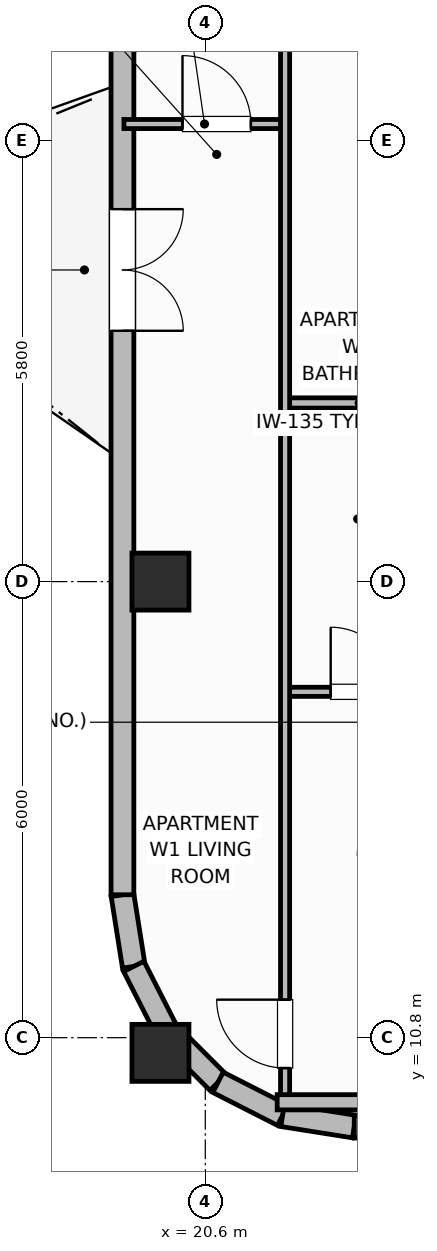
"""IFC4 building model, lengths in metres.
Left out: names, types, materials, properties, quantities, classifications, styles, units other than length and angle.
Written with IfcOpenShell. Run it as: python <this file> out.ifc"""

import sys

from ifc_helpers import new_model, si_unit, direction, frame, frame_2d, origin, origin_2d, place, context, subcontext, project, spatial, rectangle, extrude, element, fill, save


model = new_model("IFC4")
c1 = context("Model", 3, precision=1e-05, world=origin(), true_north=direction((0.0, 1.0)))
c2 = subcontext(c1, "Body", "Model", "MODEL_VIEW")
j1 = project(units=[si_unit("LENGTHUNIT", "METRE"), si_unit("PLANEANGLEUNIT", "RADIAN")], contexts=[c1])
p1 = place(None, origin())
s1 = spatial("IfcSite", under=j1, at=p1, CompositionType="ELEMENT")
p2 = place(p1, origin())
s2 = spatial("IfcBuilding", under=s1, at=p2, CompositionType="ELEMENT")
p3 = place(p2, frame((0.0, 0.0, 275.0)))
s3 = spatial("IfcBuildingStorey", under=s2, at=p3, CompositionType="ELEMENT", Elevation=275.0)
for number, where, z_axis, x_axis in (
    (1, (20.01, 10.6, 0.0), (0.0, 0.0, 1.0), (1.0, 0.0, 0.0)),
    (2, (20.01, 16.8, 0.0), (0.0, 0.0, 1.0), (1.0, 0.0, 0.0)),
):
    element("IfcColumn", number, at=place(p3, frame(where, z_axis=z_axis, x_axis=x_axis)), inside=s3, PredefinedType="COLUMN", context=c2, shape_type="SweptSolid", body=[
        extrude(rectangle(XDim=0.75, YDim=0.75, at=origin_2d()), origin(), (0.0, 0.0, 1.0), 3.7),
    ])
p4 = place(p3, frame((19.51, 12.68, 0.0), z_axis=(0.0, 0.0, 1.0), x_axis=(0.156343617883, -0.987702725088, 0.0)))
e3 = element("IfcWall", 3, at=p4, inside=s3, PredefinedType="SOLIDWALL", context=c2, shape_type="SweptSolid", body=[
    extrude(rectangle(XDim=0.954, YDim=0.3, at=frame_2d((0.477, 0.0))), origin(), (0.0, 0.0, 1.0), 2.73),
])
for number, where, z_axis, x_axis in (
    (4, (19.659, 11.738, 0.0), (0.0, 0.0, 1.0), (0.454, -0.891, 0.0)),
    (5, (20.093, 10.887, 0.0), (0.0, 0.0, 1.0), (0.707, -0.707, 0.0)),
):
    element("IfcWall", number, at=place(p3, frame(where, z_axis=z_axis, x_axis=x_axis)), inside=s3, PredefinedType="SOLIDWALL", context=c2, shape_type="SweptSolid", body=[
        extrude(rectangle(XDim=0.954, YDim=0.3, at=frame_2d((0.477, 0.0))), origin(), (0.0, 0.0, 1.0), 2.73),
    ])
p5 = place(p3, frame((20.767, 10.212, 0.0), z_axis=(0.0, 0.0, 1.0), x_axis=(0.891023873617, -0.45395644796, 0.0)))
e6 = element("IfcWall", 6, at=p5, inside=s3, PredefinedType="SOLIDWALL", context=c2, shape_type="SweptSolid", body=[
    extrude(rectangle(XDim=0.954, YDim=0.3, at=frame_2d((0.477, 0.0))), origin(), (0.0, 0.0, 1.0), 2.73),
])
p6 = place(p3, frame((21.617, 9.779, 0.0), z_axis=(0.0, 0.0, 1.0), x_axis=(0.987669453596, -0.156553666304, 0.0)))
e7 = element("IfcWall", 7, at=p6, inside=s3, PredefinedType="SOLIDWALL", context=c2, shape_type="SweptSolid", body=[
    extrude(rectangle(XDim=0.954, YDim=0.3, at=frame_2d((0.477, 0.0))), origin(), (0.0, 0.0, 1.0), 2.73),
])
p7 = place(p3, frame((22.56, 9.63, 0.0), z_axis=(0.0, 0.0, 1.0), x_axis=(1.0, 0.0, 0.0)))
e8 = element("IfcWall", 8, at=p7, inside=s3, PredefinedType="SOLIDWALL", context=c2, shape_type="SweptSolid", body=[
    extrude(rectangle(XDim=4.45, YDim=0.3, at=frame_2d((2.225, 0.0))), origin(), (0.0, 0.0, 1.0), 2.73),
])
p8 = place(p3, frame((20.56, 26.0, 0.0), z_axis=(0.0, 0.0, 1.0), x_axis=(-0.430753686581, -0.902469534941, 0.0)))
e9 = element("IfcWall", 9, at=p8, inside=s3, PredefinedType="SOLIDWALL", context=c2, shape_type="SweptSolid", body=[
    extrude(rectangle(XDim=2.438, YDim=0.3, at=frame_2d((1.219, 0.0))), origin(), (0.0, 0.0, 1.0), 2.73),
])
p9 = place(p8, frame((0.669, 0.0, 0.92)))
e10 = element("IfcOpeningElement", 10, at=p9, cuts=e9, PredefinedType="OPENING", context=c2, shape_type="SweptSolid", body=[
    extrude(rectangle(XDim=1.1, YDim=1.65, at=frame_2d((0.55, 0.825))), frame((0.0, 0.16, 0.0), z_axis=(0.0, -1.0, 0.0), x_axis=(1.0, 0.0, 0.0)), (0.0, 0.0, 1.0), 0.32),
])
p10 = place(p3, frame((19.51, 23.8, 0.0), z_axis=(0.0, 0.0, 1.0), x_axis=(0.0, -1.0, 0.0)))
e11 = element("IfcWall", 11, at=p10, inside=s3, PredefinedType="SOLIDWALL", context=c2, shape_type="SweptSolid", body=[
    extrude(rectangle(XDim=11.12, YDim=0.3, at=frame_2d((5.56, 0.0))), origin(), (0.0, 0.0, 1.0), 2.73),
])
p11 = place(p10, frame((2.1, 0.0, 0.0)))
e12 = element("IfcOpeningElement", 12, at=p11, cuts=e11, PredefinedType="OPENING", context=c2, shape_type="SweptSolid", body=[
    extrude(rectangle(XDim=1.6, YDim=2.1, at=frame_2d((0.8, 1.05))), frame((0.0, 0.16, 0.0), z_axis=(0.0, -1.0, 0.0), x_axis=(1.0, 0.0, 0.0)), (0.0, 0.0, 1.0), 0.32),
])
p12 = place(p3, frame((21.65, 15.35, 0.0), z_axis=(0.0, 0.0, 1.0), x_axis=(1.0, 0.0, 0.0)))
e13 = element("IfcWall", 13, at=p12, inside=s3, PredefinedType="PARTITIONING", context=c2, shape_type="SweptSolid", body=[
    extrude(rectangle(XDim=1.95, YDim=0.12, at=frame_2d((0.975, 0.0))), origin(), (0.0, 0.0, 1.0), 2.56),
])
p13 = place(p12, frame((0.6, 0.0, 0.0)))
e14 = element("IfcOpeningElement", 14, at=p13, cuts=e13, PredefinedType="OPENING", context=c2, shape_type="SweptSolid", body=[
    extrude(rectangle(XDim=0.85, YDim=2.1, at=frame_2d((0.425, 1.05))), frame((0.0, 0.07, 0.0), z_axis=(0.0, -1.0, 0.0), x_axis=(1.0, 0.0, 0.0)), (0.0, 0.0, 1.0), 0.14),
])
p14 = place(p3, frame((21.65, 19.15, 0.0), z_axis=(0.0, 0.0, 1.0), x_axis=(1.0, 0.0, 0.0)))
e15 = element("IfcWall", 15, at=p14, inside=s3, PredefinedType="PARTITIONING", context=c2, shape_type="SweptSolid", body=[
    extrude(rectangle(XDim=1.95, YDim=0.135, at=frame_2d((0.975, 0.0))), origin(), (0.0, 0.0, 1.0), 2.56),
])
p15 = place(p3, frame((19.53, 22.82, 0.0), z_axis=(0.0, 0.0, 1.0), x_axis=(1.0, 0.0, 0.0)))
e16 = element("IfcWall", 16, at=p15, inside=s3, PredefinedType="PARTITIONING", context=c2, shape_type="SweptSolid", body=[
    extrude(rectangle(XDim=2.12, YDim=0.12, at=frame_2d((1.06, 0.0))), origin(), (0.0, 0.0, 1.0), 2.56),
])
p16 = place(p15, frame((0.77, 0.0, 0.0)))
e17 = element("IfcOpeningElement", 17, at=p16, cuts=e16, PredefinedType="OPENING", context=c2, shape_type="SweptSolid", body=[
    extrude(rectangle(XDim=0.9, YDim=2.1, at=frame_2d((0.45, 1.05))), frame((0.0, 0.07, 0.0), z_axis=(0.0, -1.0, 0.0), x_axis=(1.0, 0.0, 0.0)), (0.0, 0.0, 1.0), 0.14),
])
p17 = place(p3, frame((21.65, 9.99, 0.0), z_axis=(0.0, 0.0, 1.0), x_axis=(0.0, 1.0, 0.0)))
e18 = element("IfcWall", 18, at=p17, inside=s3, PredefinedType="PARTITIONING", context=c2, shape_type="SweptSolid", body=[
    extrude(rectangle(XDim=36.42, YDim=0.12, at=frame_2d((18.21, 0.0))), origin(), (0.0, 0.0, 1.0), 2.56),
])
p18 = place(p17, frame((0.41, 0.0, 0.0)))
e19 = element("IfcOpeningElement", 19, at=p18, cuts=e18, PredefinedType="OPENING", context=c2, shape_type="SweptSolid", body=[
    extrude(rectangle(XDim=0.9, YDim=2.1, at=frame_2d((0.45, 1.05))), frame((0.0, 0.07, 0.0), z_axis=(0.0, -1.0, 0.0), x_axis=(1.0, 0.0, 0.0)), (0.0, 0.0, 1.0), 0.14),
])
p19 = place(p17, frame((15.56, 0.0, 0.0)))
e20 = element("IfcOpeningElement", 20, at=p19, cuts=e18, PredefinedType="OPENING", context=c2, shape_type="SweptSolid", body=[
    extrude(rectangle(XDim=0.82, YDim=2.08, at=frame_2d((0.41, 1.04))), frame((0.0, 0.07, 0.0), z_axis=(0.0, -1.0, 0.0), x_axis=(1.0, 0.0, 0.0)), (0.0, 0.0, 1.0), 0.14),
])
p20 = place(p3, frame((21.546, 9.95, 0.0), z_axis=(0.0, 0.0, 1.0), x_axis=(1.0, 0.0, 0.0)))
e21 = element("IfcWall", 21, at=p20, inside=s3, PredefinedType="PARTITIONING", context=c2, shape_type="SweptSolid", body=[
    extrude(rectangle(XDim=3.754, YDim=0.2, at=frame_2d((1.877, 0.0))), origin(), (0.0, 0.0, 1.0), 2.56),
])
p21 = place(p11, origin())
e22 = element("IfcDoor", 22, at=p21, inside=s3, OperationType="DOUBLE_DOOR_SINGLE_SWING", PredefinedType="DOOR", context=c2, shape_type="SweptSolid", body=[
    extrude(rectangle(XDim=1.6, YDim=2.1, at=frame_2d((0.8, 1.05))), frame((0.0, 0.025, 0.0), z_axis=(0.0, -1.0, 0.0), x_axis=(1.0, 0.0, 0.0)), (0.0, 0.0, 1.0), 0.05),
])
fill(e12, e22)
p22 = place(p13, origin())
e23 = element("IfcDoor", 23, at=p22, inside=s3, OperationType="SINGLE_SWING_LEFT", PredefinedType="DOOR", context=c2, shape_type="SweptSolid", body=[
    extrude(rectangle(XDim=0.85, YDim=2.1, at=frame_2d((0.425, 1.05))), frame((0.0, 0.025, 0.0), z_axis=(0.0, -1.0, 0.0), x_axis=(1.0, 0.0, 0.0)), (0.0, 0.0, 1.0), 0.05),
])
fill(e14, e23)
p23 = place(p16, origin())
e24 = element("IfcDoor", 24, at=p23, inside=s3, OperationType="SINGLE_SWING_LEFT", PredefinedType="DOOR", context=c2, shape_type="SweptSolid", body=[
    extrude(rectangle(XDim=0.9, YDim=2.1, at=frame_2d((0.45, 1.05))), frame((0.0, 0.025, 0.0), z_axis=(0.0, -1.0, 0.0), x_axis=(1.0, 0.0, 0.0)), (0.0, 0.0, 1.0), 0.05),
])
fill(e17, e24)
p24 = place(p18, origin())
e25 = element("IfcDoor", 25, at=p24, inside=s3, OperationType="SINGLE_SWING_RIGHT", PredefinedType="DOOR", context=c2, shape_type="SweptSolid", body=[
    extrude(rectangle(XDim=0.9, YDim=2.1, at=frame_2d((0.45, 1.05))), frame((0.0, 0.025, 0.0), z_axis=(0.0, -1.0, 0.0), x_axis=(1.0, 0.0, 0.0)), (0.0, 0.0, 1.0), 0.05),
])
fill(e19, e25)
save(model, sys.argv[1])
